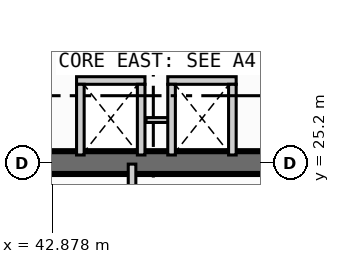
"""IFC4 building model, lengths in metres.
Left out: names, types, materials, properties, quantities, classifications, styles, units other than length and angle.
Written with IfcOpenShell. Run it as: python <this file> out.ifc"""

import sys

from ifc_helpers import new_model, si_unit, direction, frame, frame_2d, origin, place, context, subcontext, project, spatial, rectangle, extrude, element, save


model = new_model("IFC4")
c1 = context("Model", 3, precision=1e-05, world=origin(), true_north=direction((0.0, 1.0)))
c2 = subcontext(c1, "Body", "Model", "MODEL_VIEW")
j1 = project(units=[si_unit("LENGTHUNIT", "METRE"), si_unit("PLANEANGLEUNIT", "RADIAN")], contexts=[c1])
p1 = place(None, origin())
s1 = spatial("IfcSite", under=j1, at=p1, CompositionType="ELEMENT")
p2 = place(p1, origin())
s2 = spatial("IfcBuilding", under=s1, at=p2, CompositionType="ELEMENT")
p3 = place(p2, frame((0.0, 0.0, 141.8)))
s3 = spatial("IfcBuildingStorey", under=s2, at=p3, CompositionType="ELEMENT", Elevation=141.8)
p4 = place(p3, frame((42.2, 25.2, 0.0), z_axis=(0.0, 0.0, 1.0), x_axis=(1.0, 0.0, 0.0)))
e1 = element("IfcWall", 1, at=p4, inside=s3, PredefinedType="SHEAR", context=c2, shape_type="SweptSolid", body=[
    extrude(rectangle(XDim=8.6, YDim=0.75, at=frame_2d((4.3, 0.0))), origin(), (0.0, 0.0, 1.0), 3.55),
])
p5 = place(p3, frame((45.5, 21.0, 0.0), z_axis=(0.0, 0.0, 1.0), x_axis=(0.0, 1.0, 0.0)))
e2 = element("IfcWall", 2, at=p5, inside=s3, PredefinedType="SOLIDWALL", context=c2, shape_type="SweptSolid", body=[
    extrude(rectangle(XDim=4.15, YDim=0.25, at=frame_2d((2.075, 0.0))), origin(), (0.0, 0.0, 1.0), 3.55),
])
p6 = place(p5, frame((0.65, 0.0, 0.0)))
e3 = element("IfcOpeningElement", 3, at=p6, cuts=e2, PredefinedType="OPENING", context=c2, shape_type="SweptSolid", body=[
    extrude(rectangle(XDim=1.1, YDim=2.15, at=frame_2d((0.55, 1.075))), frame((0.0, 0.135, 0.0), z_axis=(0.0, -1.0, 0.0), x_axis=(1.0, 0.0, 0.0)), (0.0, 0.0, 1.0), 0.27),
])
p7 = place(p3, frame((43.675, 27.9, 0.0), z_axis=(0.0, 0.0, 1.0), x_axis=(1.0, 0.0, 0.0)))
e4 = element("IfcWall", 4, at=p7, inside=s3, PredefinedType="SOLIDWALL", context=c2, shape_type="SweptSolid", body=[
    extrude(rectangle(XDim=2.25, YDim=0.25, at=frame_2d((1.125, 0.0))), origin(), (0.0, 0.0, 1.0), 3.55),
])
for number, where, z_axis, x_axis in (
    (5, (43.8, 25.45, 0.0), (0.0, 0.0, 1.0), (0.0, 1.0, 0.0)),
    (6, (45.8, 25.45, 0.0), (0.0, 0.0, 1.0), (0.0, 1.0, 0.0)),
):
    element("IfcWall", number, at=place(p3, frame(where, z_axis=z_axis, x_axis=x_axis)), inside=s3, PredefinedType="SOLIDWALL", context=c2, shape_type="SweptSolid", body=[
        extrude(rectangle(XDim=2.325, YDim=0.25, at=frame_2d((1.163, 0.0))), origin(), (0.0, 0.0, 1.0), 3.55),
    ])
p8 = place(p3, frame((45.96, 26.6, 0.0), z_axis=(0.0, 0.0, 1.0), x_axis=(1.0, 0.0, 0.0)))
e7 = element("IfcWall", 7, at=p8, inside=s3, PredefinedType="PARTITIONING", context=c2, shape_type="SweptSolid", body=[
    extrude(rectangle(XDim=0.88, YDim=0.16, at=frame_2d((0.44, 0.0))), origin(), (0.0, 0.0, 1.0), 3.55),
])
p9 = place(p3, frame((46.675, 27.9, 0.0), z_axis=(0.0, 0.0, 1.0), x_axis=(1.0, 0.0, 0.0)))
e8 = element("IfcWall", 8, at=p9, inside=s3, PredefinedType="SOLIDWALL", context=c2, shape_type="SweptSolid", body=[
    extrude(rectangle(XDim=2.25, YDim=0.25, at=frame_2d((1.125, 0.0))), origin(), (0.0, 0.0, 1.0), 3.55),
])
for number, where, z_axis, x_axis in (
    (9, (46.8, 25.45, 0.0), (0.0, 0.0, 1.0), (0.0, 1.0, 0.0)),
    (10, (48.8, 25.45, 0.0), (0.0, 0.0, 1.0), (0.0, 1.0, 0.0)),
):
    element("IfcWall", number, at=place(p3, frame(where, z_axis=z_axis, x_axis=x_axis)), inside=s3, PredefinedType="SOLIDWALL", context=c2, shape_type="SweptSolid", body=[
        extrude(rectangle(XDim=2.325, YDim=0.25, at=frame_2d((1.163, 0.0))), origin(), (0.0, 0.0, 1.0), 3.55),
    ])
save(model, sys.argv[1])
